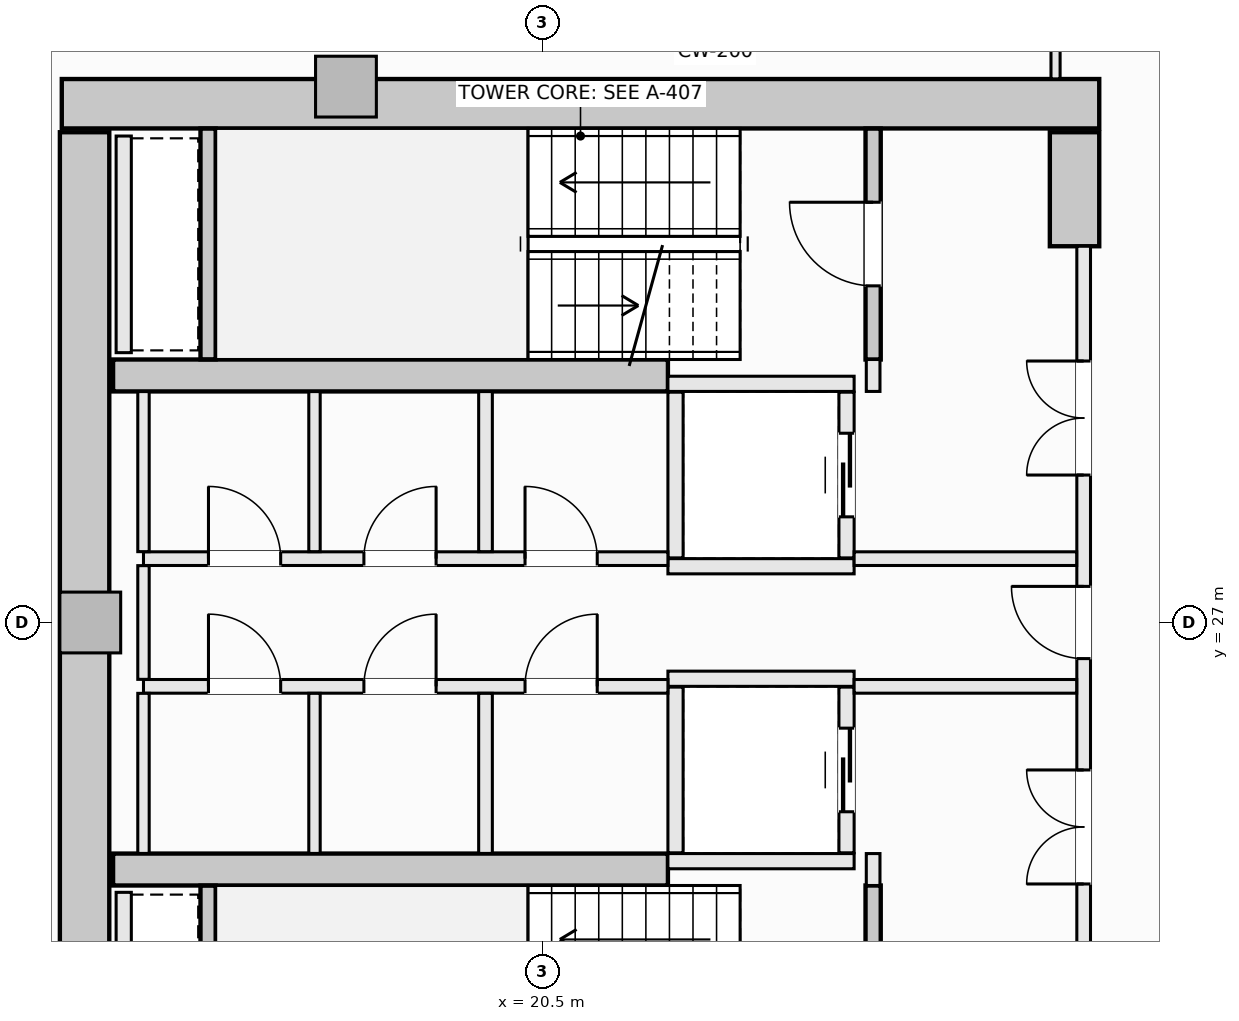
"""IFC4 building model, lengths in metres.
Left out: names, types, materials, properties, quantities, classifications, styles, units other than length and angle.
Written with IfcOpenShell. Run it as: python <this file> out.ifc"""

import sys

from ifc_helpers import new_model, si_unit, direction, frame, frame_2d, origin, origin_2d, place, context, subcontext, project, spatial, rectangle, extrude, element, fill, save


model = new_model("IFC4")
c1 = context("Model", 3, precision=1e-05, world=origin(), true_north=direction((0.0, 1.0)))
c2 = subcontext(c1, "Body", "Model", "MODEL_VIEW")
j1 = project(units=[si_unit("LENGTHUNIT", "METRE"), si_unit("PLANEANGLEUNIT", "RADIAN")], contexts=[c1])
p1 = place(None, origin())
s1 = spatial("IfcSite", under=j1, at=p1, CompositionType="ELEMENT")
p2 = place(p1, origin())
s2 = spatial("IfcBuilding", under=s1, at=p2, CompositionType="ELEMENT")
p3 = place(p2, frame((0.0, 0.0, 108.7)))
s3 = spatial("IfcBuildingStorey", under=s2, at=p3, CompositionType="ELEMENT", Elevation=108.7)
p4 = place(p3, frame((14.175, 33.825, -0.27), z_axis=(0.0, 0.0, 1.0), x_axis=(1.0, 0.0, 0.0)))
e1 = element("IfcWall", 1, at=p4, inside=s3, PredefinedType="SHEAR", context=c2, shape_type="SweptSolid", body=[
    extrude(rectangle(XDim=13.65, YDim=0.65, at=frame_2d((6.825, 0.0))), origin(), (0.0, 0.0, 1.0), 3.4),
])
p5 = place(p3, frame((14.475, 20.55, -0.27), z_axis=(0.0, 0.0, 1.0), x_axis=(0.0, 1.0, 0.0)))
e2 = element("IfcWall", 2, at=p5, inside=s3, PredefinedType="SHEAR", context=c2, shape_type="SweptSolid", body=[
    extrude(rectangle(XDim=12.9, YDim=0.65, at=frame_2d((6.45, 0.0))), origin(), (0.0, 0.0, 1.0), 3.4),
])
p6 = place(p3, frame((27.5, 31.95, -0.27), z_axis=(0.0, 0.0, 1.0), x_axis=(0.0, 1.0, 0.0)))
e3 = element("IfcWall", 3, at=p6, inside=s3, PredefinedType="SHEAR", context=c2, shape_type="SweptSolid", body=[
    extrude(rectangle(XDim=1.5, YDim=0.65, at=frame_2d((0.75, 0.0))), origin(), (0.0, 0.0, 1.0), 3.4),
])
for number, where, z_axis, x_axis in (
    (4, (14.85, 30.25, -0.27), (0.0, 0.0, 1.0), (1.0, 0.0, 0.0)),
    (5, (14.85, 23.75, -0.27), (0.0, 0.0, 1.0), (1.0, 0.0, 0.0)),
):
    element("IfcWall", number, at=place(p3, frame(where, z_axis=z_axis, x_axis=x_axis)), inside=s3, PredefinedType="SHEAR", context=c2, shape_type="SweptSolid", body=[
        extrude(rectangle(XDim=7.3, YDim=0.42, at=frame_2d((3.65, 0.0))), origin(), (0.0, 0.0, 1.0), 3.4),
    ])
for number, where, z_axis, x_axis in (
    (6, (17.914, 34.05, -0.27), (0.0, 0.0, 1.0), (1.0, 0.0, 0.0)),
    (7, (14.55, 27.0, -0.27), (0.0, 0.0, 1.0), (1.0, 0.0, 0.0)),
):
    element("IfcColumn", number, at=place(p3, frame(where, z_axis=z_axis, x_axis=x_axis)), inside=s3, PredefinedType="PILASTER", context=c2, shape_type="SweptSolid", body=[
        extrude(rectangle(XDim=0.8, YDim=0.8, at=origin_2d()), origin(), (0.0, 0.0, 1.0), 3.4),
    ])
p7 = place(p3, frame((24.85, 30.46, -0.27), z_axis=(0.0, 0.0, 1.0), x_axis=(0.0, 1.0, 0.0)))
e8 = element("IfcWall", 8, at=p7, inside=s3, PredefinedType="SHEAR", context=c2, shape_type="SweptSolid", body=[
    extrude(rectangle(XDim=3.038, YDim=0.2, at=frame_2d((1.519, 0.0))), origin(), (0.0, 0.0, 1.0), 3.4),
])
p8 = place(p7, frame((0.969, 0.0, 0.27)))
e9 = element("IfcOpeningElement", 9, at=p8, cuts=e8, PredefinedType="OPENING", context=c2, shape_type="SweptSolid", body=[
    extrude(rectangle(XDim=1.1, YDim=2.15, at=frame_2d((0.55, 1.075))), frame((0.0, 0.11, 0.0), z_axis=(0.0, -1.0, 0.0), x_axis=(1.0, 0.0, 0.0)), (0.0, 0.0, 1.0), 0.22),
])
p9 = place(p3, frame((16.1, 30.462, -0.27), z_axis=(0.0, 0.0, 1.0), x_axis=(0.0, 1.0, 0.0)))
e10 = element("IfcWall", 10, at=p9, inside=s3, PredefinedType="SHEAR", context=c2, shape_type="SweptSolid", body=[
    extrude(rectangle(XDim=3.036, YDim=0.2, at=frame_2d((1.518, 0.0))), origin(), (0.0, 0.0, 1.0), 3.4),
])
p10 = place(p3, frame((24.85, 20.502, -0.27), z_axis=(0.0, 0.0, 1.0), x_axis=(0.0, 1.0, 0.0)))
e11 = element("IfcWall", 11, at=p10, inside=s3, PredefinedType="SHEAR", context=c2, shape_type="SweptSolid", body=[
    extrude(rectangle(XDim=3.038, YDim=0.2, at=frame_2d((1.519, 0.0))), origin(), (0.0, 0.0, 1.0), 3.4),
])
p11 = place(p10, frame((0.969, 0.0, 0.27)))
e12 = element("IfcOpeningElement", 12, at=p11, cuts=e11, PredefinedType="OPENING", context=c2, shape_type="SweptSolid", body=[
    extrude(rectangle(XDim=1.1, YDim=2.15, at=frame_2d((0.55, 1.075))), frame((0.0, 0.11, 0.0), z_axis=(0.0, -1.0, 0.0), x_axis=(1.0, 0.0, 0.0)), (0.0, 0.0, 1.0), 0.22),
])
p12 = place(p3, frame((16.1, 20.502, -0.27), z_axis=(0.0, 0.0, 1.0), x_axis=(0.0, 1.0, 0.0)))
e13 = element("IfcWall", 13, at=p12, inside=s3, PredefinedType="SHEAR", context=c2, shape_type="SweptSolid", body=[
    extrude(rectangle(XDim=3.036, YDim=0.2, at=frame_2d((1.518, 0.0))), origin(), (0.0, 0.0, 1.0), 3.4),
])
for number, where, z_axis, x_axis in (
    (14, (22.15, 30.14, 0.0), (0.0, 0.0, 1.0), (1.0, 0.0, 0.0)),
    (15, (22.15, 27.74, 0.0), (0.0, 0.0, 1.0), (1.0, 0.0, 0.0)),
):
    element("IfcWall", number, at=place(p3, frame(where, z_axis=z_axis, x_axis=x_axis)), inside=s3, PredefinedType="SOLIDWALL", context=c2, shape_type="SweptSolid", body=[
        extrude(rectangle(XDim=2.45, YDim=0.2, at=frame_2d((1.225, 0.0))), origin(), (0.0, 0.0, 1.0), 3.13),
    ])
p13 = place(p3, frame((22.25, 27.85, 0.0), z_axis=(0.0, 0.0, 1.0), x_axis=(0.0, 1.0, 0.0)))
e16 = element("IfcWall", 16, at=p13, inside=s3, PredefinedType="SOLIDWALL", context=c2, shape_type="SweptSolid", body=[
    extrude(rectangle(XDim=2.18, YDim=0.2, at=frame_2d((1.09, 0.0))), origin(), (0.0, 0.0, 1.0), 3.13),
])
p14 = place(p3, frame((24.5, 27.85, 0.0), z_axis=(0.0, 0.0, 1.0), x_axis=(0.0, 1.0, 0.0)))
e17 = element("IfcWall", 17, at=p14, inside=s3, PredefinedType="SOLIDWALL", context=c2, shape_type="SweptSolid", body=[
    extrude(rectangle(XDim=2.18, YDim=0.2, at=frame_2d((1.09, 0.0))), origin(), (0.0, 0.0, 1.0), 3.13),
])
p15 = place(p14, frame((0.54, 0.0, 0.0)))
e18 = element("IfcOpeningElement", 18, at=p15, cuts=e17, PredefinedType="OPENING", context=c2, shape_type="SweptSolid", body=[
    extrude(rectangle(XDim=1.1, YDim=2.2, at=frame_2d((0.55, 1.1))), frame((0.0, 0.11, 0.0), z_axis=(0.0, -1.0, 0.0), x_axis=(1.0, 0.0, 0.0)), (0.0, 0.0, 1.0), 0.22),
])
for number, where, z_axis, x_axis in (
    (19, (22.15, 26.26, 0.0), (0.0, 0.0, 1.0), (1.0, 0.0, 0.0)),
    (20, (22.15, 23.86, 0.0), (0.0, 0.0, 1.0), (1.0, 0.0, 0.0)),
):
    element("IfcWall", number, at=place(p3, frame(where, z_axis=z_axis, x_axis=x_axis)), inside=s3, PredefinedType="SOLIDWALL", context=c2, shape_type="SweptSolid", body=[
        extrude(rectangle(XDim=2.45, YDim=0.2, at=frame_2d((1.225, 0.0))), origin(), (0.0, 0.0, 1.0), 3.13),
    ])
p16 = place(p3, frame((22.25, 23.97, 0.0), z_axis=(0.0, 0.0, 1.0), x_axis=(0.0, 1.0, 0.0)))
e21 = element("IfcWall", 21, at=p16, inside=s3, PredefinedType="SOLIDWALL", context=c2, shape_type="SweptSolid", body=[
    extrude(rectangle(XDim=2.18, YDim=0.2, at=frame_2d((1.09, 0.0))), origin(), (0.0, 0.0, 1.0), 3.13),
])
p17 = place(p3, frame((24.5, 23.97, 0.0), z_axis=(0.0, 0.0, 1.0), x_axis=(0.0, 1.0, 0.0)))
e22 = element("IfcWall", 22, at=p17, inside=s3, PredefinedType="SOLIDWALL", context=c2, shape_type="SweptSolid", body=[
    extrude(rectangle(XDim=2.18, YDim=0.2, at=frame_2d((1.09, 0.0))), origin(), (0.0, 0.0, 1.0), 3.13),
])
p18 = place(p17, frame((0.54, 0.0, 0.0)))
e23 = element("IfcOpeningElement", 23, at=p18, cuts=e22, PredefinedType="OPENING", context=c2, shape_type="SweptSolid", body=[
    extrude(rectangle(XDim=1.1, YDim=2.2, at=frame_2d((0.55, 1.1))), frame((0.0, 0.11, 0.0), z_axis=(0.0, -1.0, 0.0), x_axis=(1.0, 0.0, 0.0)), (0.0, 0.0, 1.0), 0.22),
])
for number, where, z_axis, x_axis in (
    (24, (14.99, 30.55, 0.0), (0.0, 0.0, 1.0), (0.0, 1.0, 0.0)),
    (25, (14.99, 20.6, 0.0), (0.0, 0.0, 1.0), (0.0, 1.0, 0.0)),
):
    element("IfcWall", number, at=place(p3, frame(where, z_axis=z_axis, x_axis=x_axis)), inside=s3, PredefinedType="SOLIDWALL", context=c2, shape_type="SweptSolid", body=[
        extrude(rectangle(XDim=2.85, YDim=0.2, at=frame_2d((1.425, 0.0))), origin(), (0.0, 0.0, 1.0), 3.13),
    ])
for number, where, z_axis, x_axis in (
    (26, (24.85, 23.54, 0.0), (0.0, 0.0, 1.0), (0.0, 1.0, 0.0)),
    (27, (24.85, 30.04, 0.0), (0.0, 0.0, 1.0), (0.0, 1.0, 0.0)),
):
    element("IfcWall", number, at=place(p3, frame(where, z_axis=z_axis, x_axis=x_axis)), inside=s3, PredefinedType="SOLIDWALL", context=c2, shape_type="SweptSolid", body=[
        extrude(rectangle(XDim=0.42, YDim=0.18, at=frame_2d((0.21, 0.0))), origin(), (0.0, 0.0, 1.0), 3.13),
    ])
p19 = place(p3, frame((27.62, 22.05, 0.0), z_axis=(0.0, 0.0, 1.0), x_axis=(0.0, 1.0, 0.0)))
e28 = element("IfcWall", 28, at=p19, inside=s3, PredefinedType="SOLIDWALL", context=c2, shape_type="SweptSolid", body=[
    extrude(rectangle(XDim=9.9, YDim=0.18, at=frame_2d((4.95, 0.0))), origin(), (0.0, 0.0, 1.0), 3.13),
])
p20 = place(p19, frame((4.475, 0.0, 0.0)))
e29 = element("IfcOpeningElement", 29, at=p20, cuts=e28, PredefinedType="OPENING", context=c2, shape_type="SweptSolid", body=[
    extrude(rectangle(XDim=0.95, YDim=2.1, at=frame_2d((0.475, 1.05))), frame((0.0, 0.1, 0.0), z_axis=(0.0, -1.0, 0.0), x_axis=(1.0, 0.0, 0.0)), (0.0, 0.0, 1.0), 0.2),
])
p21 = place(p19, frame((6.89, 0.0, 0.0)))
e30 = element("IfcOpeningElement", 30, at=p21, cuts=e28, PredefinedType="OPENING", context=c2, shape_type="SweptSolid", body=[
    extrude(rectangle(XDim=1.5, YDim=2.2, at=frame_2d((0.75, 1.1))), frame((0.0, 0.1, 0.0), z_axis=(0.0, -1.0, 0.0), x_axis=(1.0, 0.0, 0.0)), (0.0, 0.0, 1.0), 0.2),
])
p22 = place(p19, frame((1.51, 0.0, 0.0)))
e31 = element("IfcOpeningElement", 31, at=p22, cuts=e28, PredefinedType="OPENING", context=c2, shape_type="SweptSolid", body=[
    extrude(rectangle(XDim=1.5, YDim=2.2, at=frame_2d((0.75, 1.1))), frame((0.0, 0.1, 0.0), z_axis=(0.0, -1.0, 0.0), x_axis=(1.0, 0.0, 0.0)), (0.0, 0.0, 1.0), 0.2),
])
p23 = place(p3, frame((15.25, 27.84, 0.0), z_axis=(0.0, 0.0, 1.0), x_axis=(1.0, 0.0, 0.0)))
e32 = element("IfcWall", 32, at=p23, inside=s3, PredefinedType="SOLIDWALL", context=c2, shape_type="SweptSolid", body=[
    extrude(rectangle(XDim=6.9, YDim=0.18, at=frame_2d((3.45, 0.0))), origin(), (0.0, 0.0, 1.0), 3.13),
])
p24 = place(p23, frame((5.02, 0.0, 0.0)))
e33 = element("IfcOpeningElement", 33, at=p24, cuts=e32, PredefinedType="OPENING", context=c2, shape_type="SweptSolid", body=[
    extrude(rectangle(XDim=0.95, YDim=2.1, at=frame_2d((0.475, 1.05))), frame((0.0, 0.1, 0.0), z_axis=(0.0, -1.0, 0.0), x_axis=(1.0, 0.0, 0.0)), (0.0, 0.0, 1.0), 0.2),
])
p25 = place(p23, frame((0.855, 0.0, 0.0)))
e34 = element("IfcOpeningElement", 34, at=p25, cuts=e32, PredefinedType="OPENING", context=c2, shape_type="SweptSolid", body=[
    extrude(rectangle(XDim=0.95, YDim=2.1, at=frame_2d((0.475, 1.05))), frame((0.0, 0.1, 0.0), z_axis=(0.0, -1.0, 0.0), x_axis=(1.0, 0.0, 0.0)), (0.0, 0.0, 1.0), 0.2),
])
p26 = place(p23, frame((2.9, 0.0, 0.0)))
e35 = element("IfcOpeningElement", 35, at=p26, cuts=e32, PredefinedType="OPENING", context=c2, shape_type="SweptSolid", body=[
    extrude(rectangle(XDim=0.95, YDim=2.1, at=frame_2d((0.475, 1.05))), frame((0.0, 0.1, 0.0), z_axis=(0.0, -1.0, 0.0), x_axis=(1.0, 0.0, 0.0)), (0.0, 0.0, 1.0), 0.2),
])
p27 = place(p3, frame((24.6, 27.84, 0.0), z_axis=(0.0, 0.0, 1.0), x_axis=(1.0, 0.0, 0.0)))
e36 = element("IfcWall", 36, at=p27, inside=s3, PredefinedType="SOLIDWALL", context=c2, shape_type="SweptSolid", body=[
    extrude(rectangle(XDim=2.928, YDim=0.18, at=frame_2d((1.464, 0.0))), origin(), (0.0, 0.0, 1.0), 3.13),
])
p28 = place(p3, frame((15.25, 26.16, 0.0), z_axis=(0.0, 0.0, 1.0), x_axis=(1.0, 0.0, 0.0)))
e37 = element("IfcWall", 37, at=p28, inside=s3, PredefinedType="SOLIDWALL", context=c2, shape_type="SweptSolid", body=[
    extrude(rectangle(XDim=6.9, YDim=0.18, at=frame_2d((3.45, 0.0))), origin(), (0.0, 0.0, 1.0), 3.13),
])
p29 = place(p28, frame((5.02, 0.0, 0.0)))
e38 = element("IfcOpeningElement", 38, at=p29, cuts=e37, PredefinedType="OPENING", context=c2, shape_type="SweptSolid", body=[
    extrude(rectangle(XDim=0.95, YDim=2.1, at=frame_2d((0.475, 1.05))), frame((0.0, 0.1, 0.0), z_axis=(0.0, -1.0, 0.0), x_axis=(1.0, 0.0, 0.0)), (0.0, 0.0, 1.0), 0.2),
])
p30 = place(p28, frame((0.855, 0.0, 0.0)))
e39 = element("IfcOpeningElement", 39, at=p30, cuts=e37, PredefinedType="OPENING", context=c2, shape_type="SweptSolid", body=[
    extrude(rectangle(XDim=0.95, YDim=2.1, at=frame_2d((0.475, 1.05))), frame((0.0, 0.1, 0.0), z_axis=(0.0, -1.0, 0.0), x_axis=(1.0, 0.0, 0.0)), (0.0, 0.0, 1.0), 0.2),
])
p31 = place(p28, frame((2.9, 0.0, 0.0)))
e40 = element("IfcOpeningElement", 40, at=p31, cuts=e37, PredefinedType="OPENING", context=c2, shape_type="SweptSolid", body=[
    extrude(rectangle(XDim=0.95, YDim=2.1, at=frame_2d((0.475, 1.05))), frame((0.0, 0.1, 0.0), z_axis=(0.0, -1.0, 0.0), x_axis=(1.0, 0.0, 0.0)), (0.0, 0.0, 1.0), 0.2),
])
p32 = place(p3, frame((24.6, 26.16, 0.0), z_axis=(0.0, 0.0, 1.0), x_axis=(1.0, 0.0, 0.0)))
e41 = element("IfcWall", 41, at=p32, inside=s3, PredefinedType="SOLIDWALL", context=c2, shape_type="SweptSolid", body=[
    extrude(rectangle(XDim=2.928, YDim=0.18, at=frame_2d((1.464, 0.0))), origin(), (0.0, 0.0, 1.0), 3.13),
])
p33 = place(p3, frame((15.25, 23.962, 0.0), z_axis=(0.0, 0.0, 1.0), x_axis=(0.0, 1.0, 0.0)))
e42 = element("IfcWall", 42, at=p33, inside=s3, PredefinedType="PARTITIONING", context=c2, shape_type="SweptSolid", body=[
    extrude(rectangle(XDim=2.106, YDim=0.15, at=frame_2d((1.053, 0.0))), origin(), (0.0, 0.0, 1.0), 3.13),
])
p34 = place(p3, frame((15.25, 26.252, 0.0), z_axis=(0.0, 0.0, 1.0), x_axis=(0.0, 1.0, 0.0)))
e43 = element("IfcWall", 43, at=p34, inside=s3, PredefinedType="PARTITIONING", context=c2, shape_type="SweptSolid", body=[
    extrude(rectangle(XDim=1.496, YDim=0.15, at=frame_2d((0.748, 0.0))), origin(), (0.0, 0.0, 1.0), 3.13),
])
p35 = place(p3, frame((15.25, 27.932, 0.0), z_axis=(0.0, 0.0, 1.0), x_axis=(0.0, 1.0, 0.0)))
e44 = element("IfcWall", 44, at=p35, inside=s3, PredefinedType="PARTITIONING", context=c2, shape_type="SweptSolid", body=[
    extrude(rectangle(XDim=2.106, YDim=0.15, at=frame_2d((1.053, 0.0))), origin(), (0.0, 0.0, 1.0), 3.13),
])
for number, where, z_axis, x_axis in (
    (45, (19.75, 23.962, 0.0), (0.0, 0.0, 1.0), (0.0, 1.0, 0.0)),
    (46, (19.75, 27.932, 0.0), (0.0, 0.0, 1.0), (0.0, 1.0, 0.0)),
):
    element("IfcWall", number, at=place(p3, frame(where, z_axis=z_axis, x_axis=x_axis)), inside=s3, PredefinedType="SOLIDWALL", context=c2, shape_type="SweptSolid", body=[
        extrude(rectangle(XDim=2.106, YDim=0.18, at=frame_2d((1.053, 0.0))), origin(), (0.0, 0.0, 1.0), 3.13),
    ])
for number, where, z_axis, x_axis in (
    (47, (17.5, 23.962, 0.0), (0.0, 0.0, 1.0), (0.0, 1.0, 0.0)),
    (48, (17.5, 27.932, 0.0), (0.0, 0.0, 1.0), (0.0, 1.0, 0.0)),
):
    element("IfcWall", number, at=place(p3, frame(where, z_axis=z_axis, x_axis=x_axis)), inside=s3, PredefinedType="PARTITIONING", context=c2, shape_type="SweptSolid", body=[
        extrude(rectangle(XDim=2.106, YDim=0.15, at=frame_2d((1.053, 0.0))), origin(), (0.0, 0.0, 1.0), 3.13),
    ])
p36 = place(p3, frame((27.25, 34.152, 0.0), z_axis=(0.0, 0.0, 1.0), x_axis=(0.0, 1.0, 0.0)))
e49 = element("IfcWall", 49, at=p36, inside=s3, PredefinedType="PARTITIONING", context=c2, shape_type="SweptSolid", body=[
    extrude(rectangle(XDim=0.806, YDim=0.12, at=frame_2d((0.403, 0.0))), origin(), (0.0, 0.0, 1.0), 3.13),
])
p37 = place(p8, origin())
e50 = element("IfcDoor", 50, at=p37, inside=s3, OperationType="SINGLE_SWING_RIGHT", PredefinedType="DOOR", context=c2, shape_type="SweptSolid", body=[
    extrude(rectangle(XDim=1.1, YDim=2.15, at=frame_2d((0.55, 1.075))), frame((0.0, 0.025, 0.0), z_axis=(0.0, -1.0, 0.0), x_axis=(1.0, 0.0, 0.0)), (0.0, 0.0, 1.0), 0.05),
])
fill(e9, e50)
p38 = place(p15, origin())
e51 = element("IfcDoor", 51, at=p38, inside=s3, OperationType="SLIDING_TO_LEFT", PredefinedType="DOOR", context=c2, shape_type="SweptSolid", body=[
    extrude(rectangle(XDim=1.1, YDim=2.2, at=frame_2d((0.55, 1.1))), frame((0.0, 0.025, 0.0), z_axis=(0.0, -1.0, 0.0), x_axis=(1.0, 0.0, 0.0)), (0.0, 0.0, 1.0), 0.05),
])
fill(e18, e51)
p39 = place(p18, origin())
e52 = element("IfcDoor", 52, at=p39, inside=s3, OperationType="SLIDING_TO_LEFT", PredefinedType="DOOR", context=c2, shape_type="SweptSolid", body=[
    extrude(rectangle(XDim=1.1, YDim=2.2, at=frame_2d((0.55, 1.1))), frame((0.0, 0.025, 0.0), z_axis=(0.0, -1.0, 0.0), x_axis=(1.0, 0.0, 0.0)), (0.0, 0.0, 1.0), 0.05),
])
fill(e23, e52)
p40 = place(p20, origin())
e53 = element("IfcDoor", 53, at=p40, inside=s3, OperationType="SINGLE_SWING_RIGHT", PredefinedType="DOOR", context=c2, shape_type="SweptSolid", body=[
    extrude(rectangle(XDim=0.95, YDim=2.1, at=frame_2d((0.475, 1.05))), frame((0.0, 0.025, 0.0), z_axis=(0.0, -1.0, 0.0), x_axis=(1.0, 0.0, 0.0)), (0.0, 0.0, 1.0), 0.05),
])
fill(e29, e53)
p41 = place(p21, origin())
e54 = element("IfcDoor", 54, at=p41, inside=s3, OperationType="DOUBLE_DOOR_SINGLE_SWING", PredefinedType="DOOR", context=c2, shape_type="SweptSolid", body=[
    extrude(rectangle(XDim=1.5, YDim=2.2, at=frame_2d((0.75, 1.1))), frame((0.0, 0.025, 0.0), z_axis=(0.0, -1.0, 0.0), x_axis=(1.0, 0.0, 0.0)), (0.0, 0.0, 1.0), 0.05),
])
fill(e30, e54)
p42 = place(p22, origin())
e55 = element("IfcDoor", 55, at=p42, inside=s3, OperationType="DOUBLE_DOOR_SINGLE_SWING", PredefinedType="DOOR", context=c2, shape_type="SweptSolid", body=[
    extrude(rectangle(XDim=1.5, YDim=2.2, at=frame_2d((0.75, 1.1))), frame((0.0, 0.025, 0.0), z_axis=(0.0, -1.0, 0.0), x_axis=(1.0, 0.0, 0.0)), (0.0, 0.0, 1.0), 0.05),
])
fill(e31, e55)
p43 = place(p24, origin())
e56 = element("IfcDoor", 56, at=p43, inside=s3, OperationType="SINGLE_SWING_LEFT", PredefinedType="DOOR", context=c2, shape_type="SweptSolid", body=[
    extrude(rectangle(XDim=0.95, YDim=2.1, at=frame_2d((0.475, 1.05))), frame((0.0, 0.025, 0.0), z_axis=(0.0, -1.0, 0.0), x_axis=(1.0, 0.0, 0.0)), (0.0, 0.0, 1.0), 0.05),
])
fill(e33, e56)
p44 = place(p29, origin())
e57 = element("IfcDoor", 57, at=p44, inside=s3, OperationType="SINGLE_SWING_RIGHT", PredefinedType="DOOR", context=c2, shape_type="SweptSolid", body=[
    extrude(rectangle(XDim=0.95, YDim=2.1, at=frame_2d((0.475, 1.05))), frame((0.0, 0.025, 0.0), z_axis=(0.0, -1.0, 0.0), x_axis=(1.0, 0.0, 0.0)), (0.0, 0.0, 1.0), 0.05),
])
fill(e38, e57)
p45 = place(p25, origin())
e58 = element("IfcDoor", 58, at=p45, inside=s3, OperationType="SINGLE_SWING_LEFT", PredefinedType="DOOR", context=c2, shape_type="SweptSolid", body=[
    extrude(rectangle(XDim=0.95, YDim=2.1, at=frame_2d((0.475, 1.05))), frame((0.0, 0.025, 0.0), z_axis=(0.0, -1.0, 0.0), x_axis=(1.0, 0.0, 0.0)), (0.0, 0.0, 1.0), 0.05),
])
fill(e34, e58)
p46 = place(p26, origin())
e59 = element("IfcDoor", 59, at=p46, inside=s3, OperationType="SINGLE_SWING_RIGHT", PredefinedType="DOOR", context=c2, shape_type="SweptSolid", body=[
    extrude(rectangle(XDim=0.95, YDim=2.1, at=frame_2d((0.475, 1.05))), frame((0.0, 0.025, 0.0), z_axis=(0.0, -1.0, 0.0), x_axis=(1.0, 0.0, 0.0)), (0.0, 0.0, 1.0), 0.05),
])
fill(e35, e59)
p47 = place(p30, origin())
e60 = element("IfcDoor", 60, at=p47, inside=s3, OperationType="SINGLE_SWING_LEFT", PredefinedType="DOOR", context=c2, shape_type="SweptSolid", body=[
    extrude(rectangle(XDim=0.95, YDim=2.1, at=frame_2d((0.475, 1.05))), frame((0.0, 0.025, 0.0), z_axis=(0.0, -1.0, 0.0), x_axis=(1.0, 0.0, 0.0)), (0.0, 0.0, 1.0), 0.05),
])
fill(e39, e60)
p48 = place(p31, origin())
e61 = element("IfcDoor", 61, at=p48, inside=s3, OperationType="SINGLE_SWING_RIGHT", PredefinedType="DOOR", context=c2, shape_type="SweptSolid", body=[
    extrude(rectangle(XDim=0.95, YDim=2.1, at=frame_2d((0.475, 1.05))), frame((0.0, 0.025, 0.0), z_axis=(0.0, -1.0, 0.0), x_axis=(1.0, 0.0, 0.0)), (0.0, 0.0, 1.0), 0.05),
])
fill(e40, e61)
save(model, sys.argv[1])
